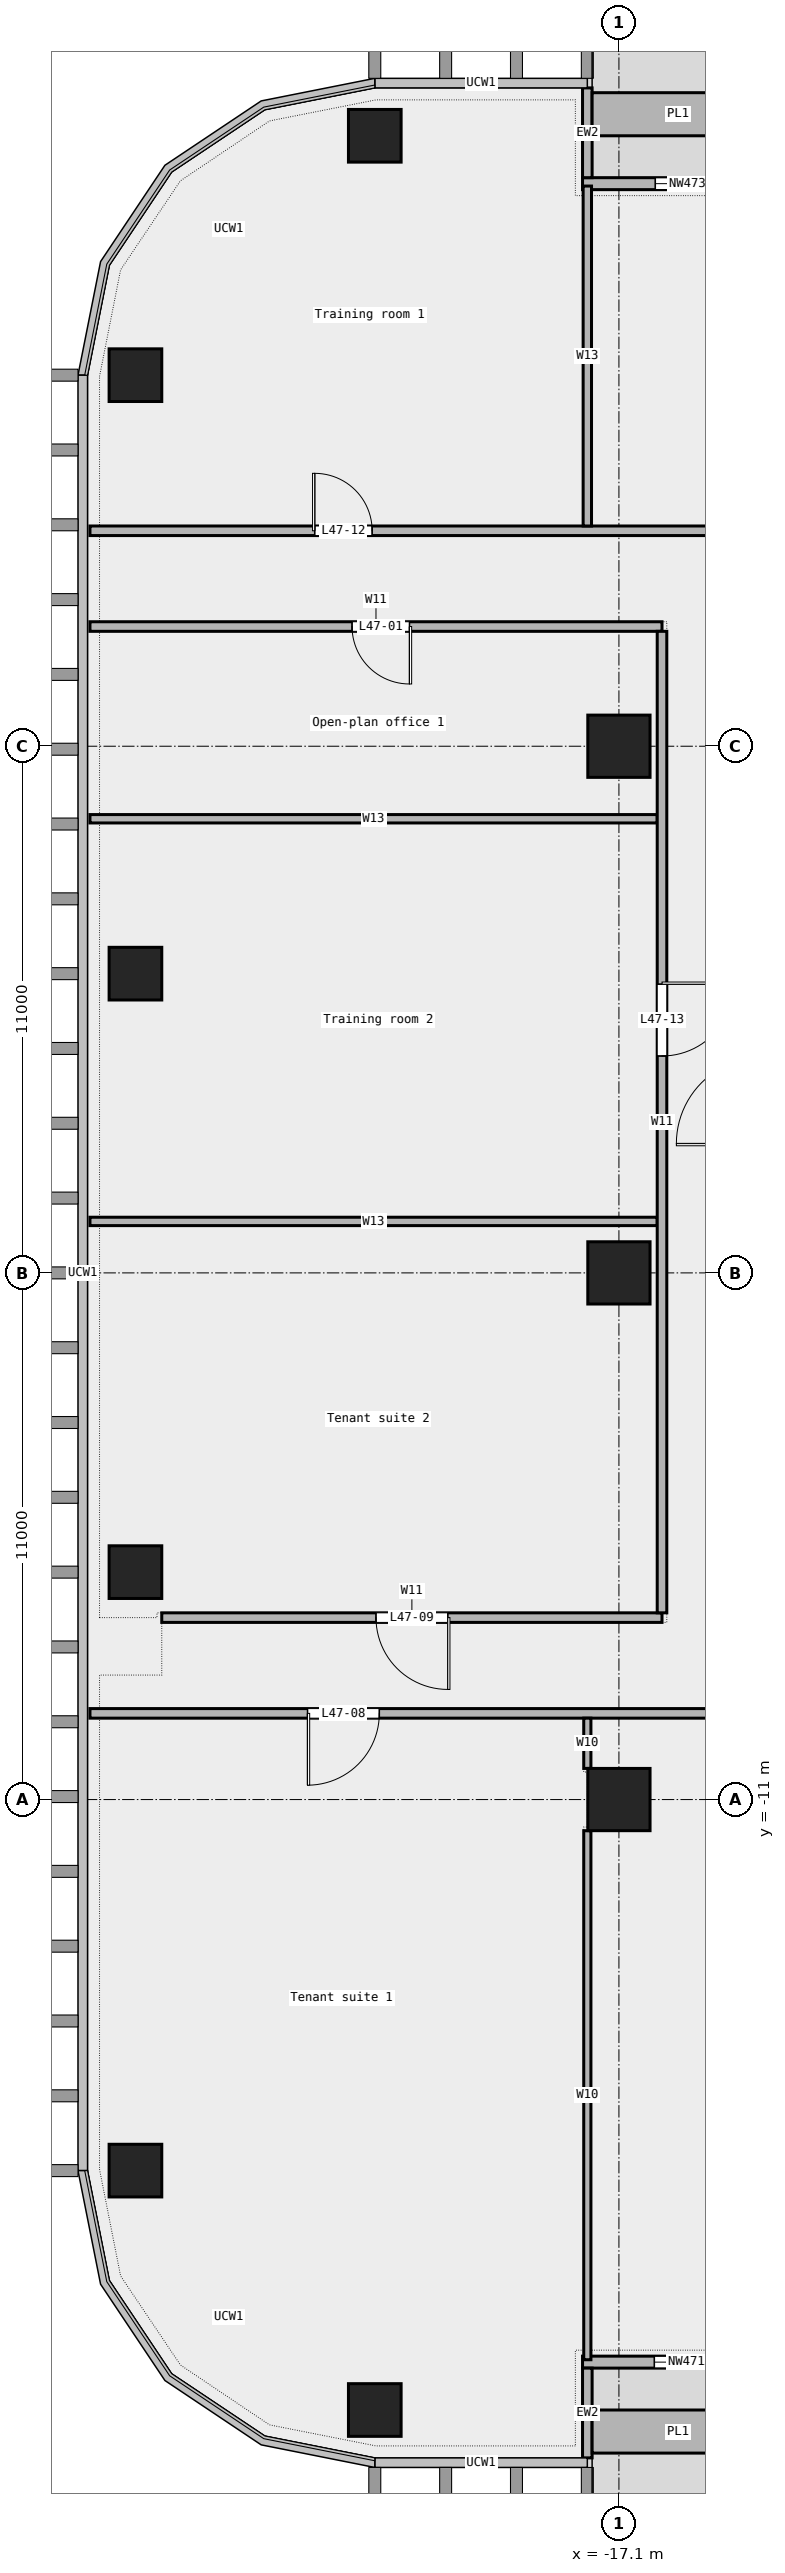
"""IFC4 building model, lengths in metres.
Left out: names, types, materials, properties, quantities, classifications, styles, units other than length and angle.
Written with IfcOpenShell. Run it as: python <this file> out.ifc"""

import sys

from ifc_helpers import new_model, si_unit, direction, frame, frame_2d, origin, origin_2d, place, context, subcontext, project, spatial, rectangle, extrude, element, fill, save


model = new_model("IFC4")
c1 = context("Model", 3, precision=1e-05, world=origin(), true_north=direction((0.0, 1.0)))
c2 = subcontext(c1, "Body", "Model", "MODEL_VIEW")
j1 = project(units=[si_unit("LENGTHUNIT", "METRE"), si_unit("PLANEANGLEUNIT", "RADIAN")], contexts=[c1])
p1 = place(None, origin())
s1 = spatial("IfcSite", under=j1, at=p1, CompositionType="ELEMENT")
p2 = place(p1, origin())
s2 = spatial("IfcBuilding", under=s1, at=p2, CompositionType="ELEMENT")
p3 = place(p2, frame((0.0, 0.0, 223.0)))
s3 = spatial("IfcBuildingStorey", under=s2, at=p3, CompositionType="ELEMENT", Elevation=223.0)
for number, where, z_axis, x_axis in (
    (1, (-22.2, -23.75, 0.0), (0.0, 0.0, 1.0), (1.0, 0.0, 0.0)),
    (2, (-22.2, 23.75, 0.0), (0.0, 0.0, 1.0), (1.0, 0.0, 0.0)),
    (3, (-27.2, 18.75, 0.0), (0.0, 0.0, 1.0), (1.0, 0.0, 0.0)),
    (4, (-27.2, 6.25, 0.0), (0.0, 0.0, 1.0), (1.0, 0.0, 0.0)),
    (5, (-27.2, -6.25, 0.0), (0.0, 0.0, 1.0), (1.0, 0.0, 0.0)),
    (6, (-27.2, -18.75, 0.0), (0.0, 0.0, 1.0), (1.0, 0.0, 0.0)),
):
    element("IfcColumn", number, at=place(p3, frame(where, z_axis=z_axis, x_axis=x_axis)), inside=s3, PredefinedType="COLUMN", context=c2, shape_type="SweptSolid", body=[
        extrude(rectangle(XDim=1.1, YDim=1.1, at=origin_2d()), origin(), (0.0, 0.0, 1.0), 3.6),
    ])
for number, where, z_axis, x_axis in (
    (7, (-17.1, -11.0, 0.0), (0.0, 0.0, 1.0), (1.0, 0.0, 0.0)),
    (8, (-17.1, 0.0, 0.0), (0.0, 0.0, 1.0), (1.0, 0.0, 0.0)),
    (9, (-17.1, 11.0, 0.0), (0.0, 0.0, 1.0), (1.0, 0.0, 0.0)),
):
    element("IfcColumn", number, at=place(p3, frame(where, z_axis=z_axis, x_axis=x_axis)), inside=s3, PredefinedType="COLUMN", context=c2, shape_type="SweptSolid", body=[
        extrude(rectangle(XDim=1.3, YDim=1.3, at=origin_2d()), origin(), (0.0, 0.0, 1.0), 3.6),
    ])
p4 = place(p3, frame((-17.86, -22.75, 0.0), z_axis=(0.0, 0.0, 1.0), x_axis=(1.0, 0.0, 0.0)))
e10 = element("IfcWall", 10, at=p4, inside=s3, PredefinedType="STANDARD", context=c2, shape_type="SweptSolid", body=[
    extrude(rectangle(XDim=13.52, YDim=0.25, at=frame_2d((6.76, 0.0))), origin(), (0.0, 0.0, 1.0), 3.6),
])
p5 = place(p4, frame((1.5, 0.0, 0.45)))
e11 = element("IfcOpeningElement", 11, at=p5, cuts=e10, PredefinedType="OPENING", context=c2, shape_type="SweptSolid", body=[
    extrude(rectangle(XDim=1.5, YDim=2.4, at=frame_2d((0.75, 1.2))), frame((0.0, 0.137, 0.0), z_axis=(0.0, -1.0, 0.0), x_axis=(1.0, 0.0, 0.0)), (0.0, 0.0, 1.0), 0.274),
])
p6 = place(p4, frame((4.0, 0.0, 0.0)))
e12 = element("IfcOpeningElement", 12, at=p6, cuts=e10, PredefinedType="OPENING", context=c2, shape_type="SweptSolid", body=[
    extrude(rectangle(XDim=1.8, YDim=2.4, at=frame_2d((0.9, 1.2))), frame((0.0, 0.137, 0.0), z_axis=(0.0, -1.0, 0.0), x_axis=(1.0, 0.0, 0.0)), (0.0, 0.0, 1.0), 0.274),
])
p7 = place(p4, frame((10.5, 0.0, 0.45)))
e13 = element("IfcOpeningElement", 13, at=p7, cuts=e10, PredefinedType="OPENING", context=c2, shape_type="SweptSolid", body=[
    extrude(rectangle(XDim=1.5, YDim=2.4, at=frame_2d((0.75, 1.2))), frame((0.0, 0.137, 0.0), z_axis=(0.0, -1.0, 0.0), x_axis=(1.0, 0.0, 0.0)), (0.0, 0.0, 1.0), 0.274),
])
p8 = place(p3, frame((-17.76, -24.75, 0.0), z_axis=(0.0, 0.0, 1.0), x_axis=(0.0, 1.0, 0.0)))
e14 = element("IfcWall", 14, at=p8, inside=s3, PredefinedType="STANDARD", context=c2, shape_type="SweptSolid", body=[
    extrude(rectangle(XDim=1.875, YDim=0.2, at=frame_2d((0.938, 0.0))), origin(), (0.0, 0.0, 1.0), 3.6),
])
p9 = place(p3, frame((-17.66, -24.2, 0.0), z_axis=(0.0, 0.0, 1.0), x_axis=(1.0, 0.0, 0.0)))
e15 = element("IfcWall", 15, at=p9, inside=s3, PredefinedType="STANDARD", context=c2, shape_type="SweptSolid", body=[
    extrude(rectangle(XDim=3.6, YDim=0.9, at=frame_2d((1.8, 0.0))), origin(), (0.0, 0.0, 1.0), 0.7),
])
p10 = place(p3, frame((-4.34, 22.75, 0.0), z_axis=(0.0, 0.0, 1.0), x_axis=(-1.0, 0.0, 0.0)))
e16 = element("IfcWall", 16, at=p10, inside=s3, PredefinedType="STANDARD", context=c2, shape_type="SweptSolid", body=[
    extrude(rectangle(XDim=13.52, YDim=0.25, at=frame_2d((6.76, 0.0))), origin(), (0.0, 0.0, 1.0), 3.6),
])
p11 = place(p10, frame((1.5, 0.0, 0.45)))
e17 = element("IfcOpeningElement", 17, at=p11, cuts=e16, PredefinedType="OPENING", context=c2, shape_type="SweptSolid", body=[
    extrude(rectangle(XDim=1.5, YDim=2.4, at=frame_2d((0.75, 1.2))), frame((0.0, 0.137, 0.0), z_axis=(0.0, -1.0, 0.0), x_axis=(1.0, 0.0, 0.0)), (0.0, 0.0, 1.0), 0.274),
])
p12 = place(p10, frame((4.0, 0.0, 0.0)))
e18 = element("IfcOpeningElement", 18, at=p12, cuts=e16, PredefinedType="OPENING", context=c2, shape_type="SweptSolid", body=[
    extrude(rectangle(XDim=1.8, YDim=2.4, at=frame_2d((0.9, 1.2))), frame((0.0, 0.137, 0.0), z_axis=(0.0, -1.0, 0.0), x_axis=(1.0, 0.0, 0.0)), (0.0, 0.0, 1.0), 0.274),
])
p13 = place(p10, frame((10.5, 0.0, 0.45)))
e19 = element("IfcOpeningElement", 19, at=p13, cuts=e16, PredefinedType="OPENING", context=c2, shape_type="SweptSolid", body=[
    extrude(rectangle(XDim=1.5, YDim=2.4, at=frame_2d((0.75, 1.2))), frame((0.0, 0.137, 0.0), z_axis=(0.0, -1.0, 0.0), x_axis=(1.0, 0.0, 0.0)), (0.0, 0.0, 1.0), 0.274),
])
p14 = place(p3, frame((-17.76, 24.75, 0.0), z_axis=(0.0, 0.0, 1.0), x_axis=(0.0, -1.0, 0.0)))
e20 = element("IfcWall", 20, at=p14, inside=s3, PredefinedType="STANDARD", context=c2, shape_type="SweptSolid", body=[
    extrude(rectangle(XDim=1.875, YDim=0.2, at=frame_2d((0.938, 0.0))), origin(), (0.0, 0.0, 1.0), 3.6),
])
p15 = place(p3, frame((-14.06, 24.2, 0.0), z_axis=(0.0, 0.0, 1.0), x_axis=(-1.0, 0.0, 0.0)))
e21 = element("IfcWall", 21, at=p15, inside=s3, PredefinedType="STANDARD", context=c2, shape_type="SweptSolid", body=[
    extrude(rectangle(XDim=3.6, YDim=0.9, at=frame_2d((1.8, 0.0))), origin(), (0.0, 0.0, 1.0), 0.7),
])
p16 = place(p3, frame((-28.15, -9.2, 0.0), z_axis=(0.0, 0.0, 1.0), x_axis=(1.0, 0.0, 0.0)))
e22 = element("IfcWall", 22, at=p16, inside=s3, PredefinedType="PARTITIONING", context=c2, shape_type="SweptSolid", body=[
    extrude(rectangle(XDim=54.3, YDim=0.2, at=frame_2d((27.15, 0.0))), origin(), (0.0, 0.0, 1.0), 3.6),
])
p17 = place(p16, frame((47.212, 0.0, 0.0)))
e23 = element("IfcOpeningElement", 23, at=p17, cuts=e22, PredefinedType="OPENING", context=c2, shape_type="SweptSolid", body=[
    extrude(rectangle(XDim=1.8, YDim=2.1, at=frame_2d((0.9, 1.05))), frame((0.0, 0.112, 0.0), z_axis=(0.0, -1.0, 0.0), x_axis=(1.0, 0.0, 0.0)), (0.0, 0.0, 1.0), 0.224),
])
p18 = place(p16, frame((16.15, 0.0, 0.0)))
e24 = element("IfcOpeningElement", 24, at=p18, cuts=e22, PredefinedType="OPENING", context=c2, shape_type="SweptSolid", body=[
    extrude(rectangle(XDim=1.8, YDim=2.1, at=frame_2d((0.9, 1.05))), frame((0.0, 0.112, 0.0), z_axis=(0.0, -1.0, 0.0), x_axis=(1.0, 0.0, 0.0)), (0.0, 0.0, 1.0), 0.224),
])
p19 = place(p16, frame((4.545, 0.0, 0.0)))
e25 = element("IfcOpeningElement", 25, at=p19, cuts=e22, PredefinedType="OPENING", context=c2, shape_type="SweptSolid", body=[
    extrude(rectangle(XDim=1.5, YDim=2.1, at=frame_2d((0.75, 1.05))), frame((0.0, 0.112, 0.0), z_axis=(0.0, -1.0, 0.0), x_axis=(1.0, 0.0, 0.0)), (0.0, 0.0, 1.0), 0.224),
])
p20 = place(p16, frame((31.117, 0.0, 0.0)))
e26 = element("IfcOpeningElement", 26, at=p20, cuts=e22, PredefinedType="OPENING", context=c2, shape_type="SweptSolid", body=[
    extrude(rectangle(XDim=1.8, YDim=2.1, at=frame_2d((0.9, 1.05))), frame((0.0, 0.112, 0.0), z_axis=(0.0, -1.0, 0.0), x_axis=(1.0, 0.0, 0.0)), (0.0, 0.0, 1.0), 0.224),
])
p21 = place(p3, frame((-26.65, -7.2, 0.0), z_axis=(0.0, 0.0, 1.0), x_axis=(1.0, 0.0, 0.0)))
e27 = element("IfcWall", 27, at=p21, inside=s3, PredefinedType="PARTITIONING", context=c2, shape_type="SweptSolid", body=[
    extrude(rectangle(XDim=10.45, YDim=0.2, at=frame_2d((5.225, 0.0))), origin(), (0.0, 0.0, 1.0), 3.6),
])
p22 = place(p21, frame((4.475, 0.0, 0.0)))
e28 = element("IfcOpeningElement", 28, at=p22, cuts=e27, PredefinedType="OPENING", context=c2, shape_type="SweptSolid", body=[
    extrude(rectangle(XDim=1.5, YDim=2.1, at=frame_2d((0.75, 1.05))), frame((0.0, 0.112, 0.0), z_axis=(0.0, -1.0, 0.0), x_axis=(1.0, 0.0, 0.0)), (0.0, 0.0, 1.0), 0.224),
])
for number, where, z_axis, x_axis in (
    (29, (-28.15, 1.075, 0.0), (0.0, 0.0, 1.0), (1.0, 0.0, 0.0)),
    (30, (-28.15, 9.485, 0.0), (0.0, 0.0, 1.0), (1.0, 0.0, 0.0)),
):
    element("IfcWall", number, at=place(p3, frame(where, z_axis=z_axis, x_axis=x_axis)), inside=s3, PredefinedType="PARTITIONING", context=c2, shape_type="SweptSolid", body=[
        extrude(rectangle(XDim=11.85, YDim=0.175, at=frame_2d((5.925, 0.0))), origin(), (0.0, 0.0, 1.0), 3.6),
    ])
p23 = place(p3, frame((-28.15, 13.5, 0.0), z_axis=(0.0, 0.0, 1.0), x_axis=(1.0, 0.0, 0.0)))
e31 = element("IfcWall", 31, at=p23, inside=s3, PredefinedType="PARTITIONING", context=c2, shape_type="SweptSolid", body=[
    extrude(rectangle(XDim=11.95, YDim=0.2, at=frame_2d((5.975, 0.0))), origin(), (0.0, 0.0, 1.0), 3.6),
])
p24 = place(p23, frame((5.475, 0.0, 0.0)))
e32 = element("IfcOpeningElement", 32, at=p24, cuts=e31, PredefinedType="OPENING", context=c2, shape_type="SweptSolid", body=[
    extrude(rectangle(XDim=1.2, YDim=2.1, at=frame_2d((0.6, 1.05))), frame((0.0, 0.112, 0.0), z_axis=(0.0, -1.0, 0.0), x_axis=(1.0, 0.0, 0.0)), (0.0, 0.0, 1.0), 0.224),
])
p25 = place(p3, frame((-28.15, 15.5, 0.0), z_axis=(0.0, 0.0, 1.0), x_axis=(1.0, 0.0, 0.0)))
e33 = element("IfcWall", 33, at=p25, inside=s3, PredefinedType="PARTITIONING", context=c2, shape_type="SweptSolid", body=[
    extrude(rectangle(XDim=56.3, YDim=0.2, at=frame_2d((28.15, 0.0))), origin(), (0.0, 0.0, 1.0), 3.6),
])
p26 = place(p25, frame((16.3, 0.0, 0.0)))
e34 = element("IfcOpeningElement", 34, at=p26, cuts=e33, PredefinedType="OPENING", context=c2, shape_type="SweptSolid", body=[
    extrude(rectangle(XDim=1.5, YDim=2.1, at=frame_2d((0.75, 1.05))), frame((0.0, 0.112, 0.0), z_axis=(0.0, -1.0, 0.0), x_axis=(1.0, 0.0, 0.0)), (0.0, 0.0, 1.0), 0.224),
])
p27 = place(p25, frame((46.225, 0.0, 0.0)))
e35 = element("IfcOpeningElement", 35, at=p27, cuts=e33, PredefinedType="OPENING", context=c2, shape_type="SweptSolid", body=[
    extrude(rectangle(XDim=1.8, YDim=2.1, at=frame_2d((0.9, 1.05))), frame((0.0, 0.112, 0.0), z_axis=(0.0, -1.0, 0.0), x_axis=(1.0, 0.0, 0.0)), (0.0, 0.0, 1.0), 0.224),
])
p28 = place(p25, frame((30.18, 0.0, 0.0)))
e36 = element("IfcOpeningElement", 36, at=p28, cuts=e33, PredefinedType="OPENING", context=c2, shape_type="SweptSolid", body=[
    extrude(rectangle(XDim=1.5, YDim=2.1, at=frame_2d((0.75, 1.05))), frame((0.0, 0.112, 0.0), z_axis=(0.0, -1.0, 0.0), x_axis=(1.0, 0.0, 0.0)), (0.0, 0.0, 1.0), 0.224),
])
p29 = place(p25, frame((4.695, 0.0, 0.0)))
e37 = element("IfcOpeningElement", 37, at=p29, cuts=e33, PredefinedType="OPENING", context=c2, shape_type="SweptSolid", body=[
    extrude(rectangle(XDim=1.2, YDim=2.1, at=frame_2d((0.6, 1.05))), frame((0.0, 0.112, 0.0), z_axis=(0.0, -1.0, 0.0), x_axis=(1.0, 0.0, 0.0)), (0.0, 0.0, 1.0), 0.224),
])
p30 = place(p3, frame((-17.76, -22.7, 0.0), z_axis=(0.0, 0.0, 1.0), x_axis=(0.0, 1.0, 0.0)))
e38 = element("IfcWall", 38, at=p30, inside=s3, PredefinedType="PARTITIONING", context=c2, shape_type="SweptSolid", body=[
    extrude(rectangle(XDim=11.05, YDim=0.15, at=frame_2d((5.525, 0.0))), origin(), (0.0, 0.0, 1.0), 3.6),
])
p31 = place(p3, frame((-17.76, -10.35, 0.0), z_axis=(0.0, 0.0, 1.0), x_axis=(0.0, 1.0, 0.0)))
e39 = element("IfcWall", 39, at=p31, inside=s3, PredefinedType="PARTITIONING", context=c2, shape_type="SweptSolid", body=[
    extrude(rectangle(XDim=1.05, YDim=0.15, at=frame_2d((0.525, 0.0))), origin(), (0.0, 0.0, 1.0), 3.6),
])
p32 = place(p3, frame((-17.76, 15.6, 0.0), z_axis=(0.0, 0.0, 1.0), x_axis=(0.0, 1.0, 0.0)))
e40 = element("IfcWall", 40, at=p32, inside=s3, PredefinedType="PARTITIONING", context=c2, shape_type="SweptSolid", body=[
    extrude(rectangle(XDim=7.1, YDim=0.175, at=frame_2d((3.55, 0.0))), origin(), (0.0, 0.0, 1.0), 3.6),
])
p33 = place(p3, frame((-16.2, -7.1, 0.0), z_axis=(0.0, 0.0, 1.0), x_axis=(0.0, 1.0, 0.0)))
e41 = element("IfcWall", 41, at=p33, inside=s3, PredefinedType="PARTITIONING", context=c2, shape_type="SweptSolid", body=[
    extrude(rectangle(XDim=20.5, YDim=0.2, at=frame_2d((10.25, 0.0))), origin(), (0.0, 0.0, 1.0), 3.6),
])
p34 = place(p33, frame((11.63, 0.0, 0.0)))
e42 = element("IfcOpeningElement", 42, at=p34, cuts=e41, PredefinedType="OPENING", context=c2, shape_type="SweptSolid", body=[
    extrude(rectangle(XDim=1.5, YDim=2.1, at=frame_2d((0.75, 1.05))), frame((0.0, 0.112, 0.0), z_axis=(0.0, -1.0, 0.0), x_axis=(1.0, 0.0, 0.0)), (0.0, 0.0, 1.0), 0.224),
])
p35 = place(p5, origin())
e43 = element("IfcWindow", 43, at=p35, inside=s3, PartitioningType="SINGLE_PANEL", PredefinedType="WINDOW", context=c2, shape_type="SweptSolid", body=[
    extrude(rectangle(XDim=1.5, YDim=2.4, at=frame_2d((0.75, 1.2))), frame((0.0, 0.03, 0.0), z_axis=(0.0, -1.0, 0.0), x_axis=(1.0, 0.0, 0.0)), (0.0, 0.0, 1.0), 0.06),
])
fill(e11, e43)
p36 = place(p13, origin())
e44 = element("IfcWindow", 44, at=p36, inside=s3, PartitioningType="SINGLE_PANEL", PredefinedType="WINDOW", context=c2, shape_type="SweptSolid", body=[
    extrude(rectangle(XDim=1.5, YDim=2.4, at=frame_2d((0.75, 1.2))), frame((0.0, 0.03, 0.0), z_axis=(0.0, -1.0, 0.0), x_axis=(1.0, 0.0, 0.0)), (0.0, 0.0, 1.0), 0.06),
])
fill(e19, e44)
p37 = place(p24, origin())
e45 = element("IfcDoor", 45, at=p37, inside=s3, OperationType="SINGLE_SWING_LEFT", PredefinedType="DOOR", context=c2, shape_type="SweptSolid", body=[
    extrude(rectangle(XDim=1.2, YDim=2.1, at=frame_2d((0.6, 1.05))), frame((0.0, 0.025, 0.0), z_axis=(0.0, -1.0, 0.0), x_axis=(1.0, 0.0, 0.0)), (0.0, 0.0, 1.0), 0.05),
])
fill(e32, e45)
p38 = place(p19, origin())
e46 = element("IfcDoor", 46, at=p38, inside=s3, OperationType="DOUBLE_DOOR_SINGLE_SWING", PredefinedType="DOOR", context=c2, shape_type="SweptSolid", body=[
    extrude(rectangle(XDim=1.5, YDim=2.1, at=frame_2d((0.75, 1.05))), frame((0.0, 0.025, 0.0), z_axis=(0.0, -1.0, 0.0), x_axis=(1.0, 0.0, 0.0)), (0.0, 0.0, 1.0), 0.05),
])
fill(e25, e46)
p39 = place(p22, origin())
e47 = element("IfcDoor", 47, at=p39, inside=s3, OperationType="DOUBLE_DOOR_SINGLE_SWING", PredefinedType="DOOR", context=c2, shape_type="SweptSolid", body=[
    extrude(rectangle(XDim=1.5, YDim=2.1, at=frame_2d((0.75, 1.05))), frame((0.0, 0.025, 0.0), z_axis=(0.0, -1.0, 0.0), x_axis=(1.0, 0.0, 0.0)), (0.0, 0.0, 1.0), 0.05),
])
fill(e28, e47)
p40 = place(p29, origin())
e48 = element("IfcDoor", 48, at=p40, inside=s3, OperationType="SINGLE_SWING_LEFT", PredefinedType="DOOR", context=c2, shape_type="SweptSolid", body=[
    extrude(rectangle(XDim=1.2, YDim=2.1, at=frame_2d((0.6, 1.05))), frame((0.0, 0.025, 0.0), z_axis=(0.0, -1.0, 0.0), x_axis=(1.0, 0.0, 0.0)), (0.0, 0.0, 1.0), 0.05),
])
fill(e37, e48)
p41 = place(p34, origin())
e49 = element("IfcDoor", 49, at=p41, inside=s3, OperationType="DOUBLE_DOOR_SINGLE_SWING", PredefinedType="DOOR", context=c2, shape_type="SweptSolid", body=[
    extrude(rectangle(XDim=1.5, YDim=2.1, at=frame_2d((0.75, 1.05))), frame((0.0, 0.025, 0.0), z_axis=(0.0, -1.0, 0.0), x_axis=(1.0, 0.0, 0.0)), (0.0, 0.0, 1.0), 0.05),
])
fill(e42, e49)
save(model, sys.argv[1])
